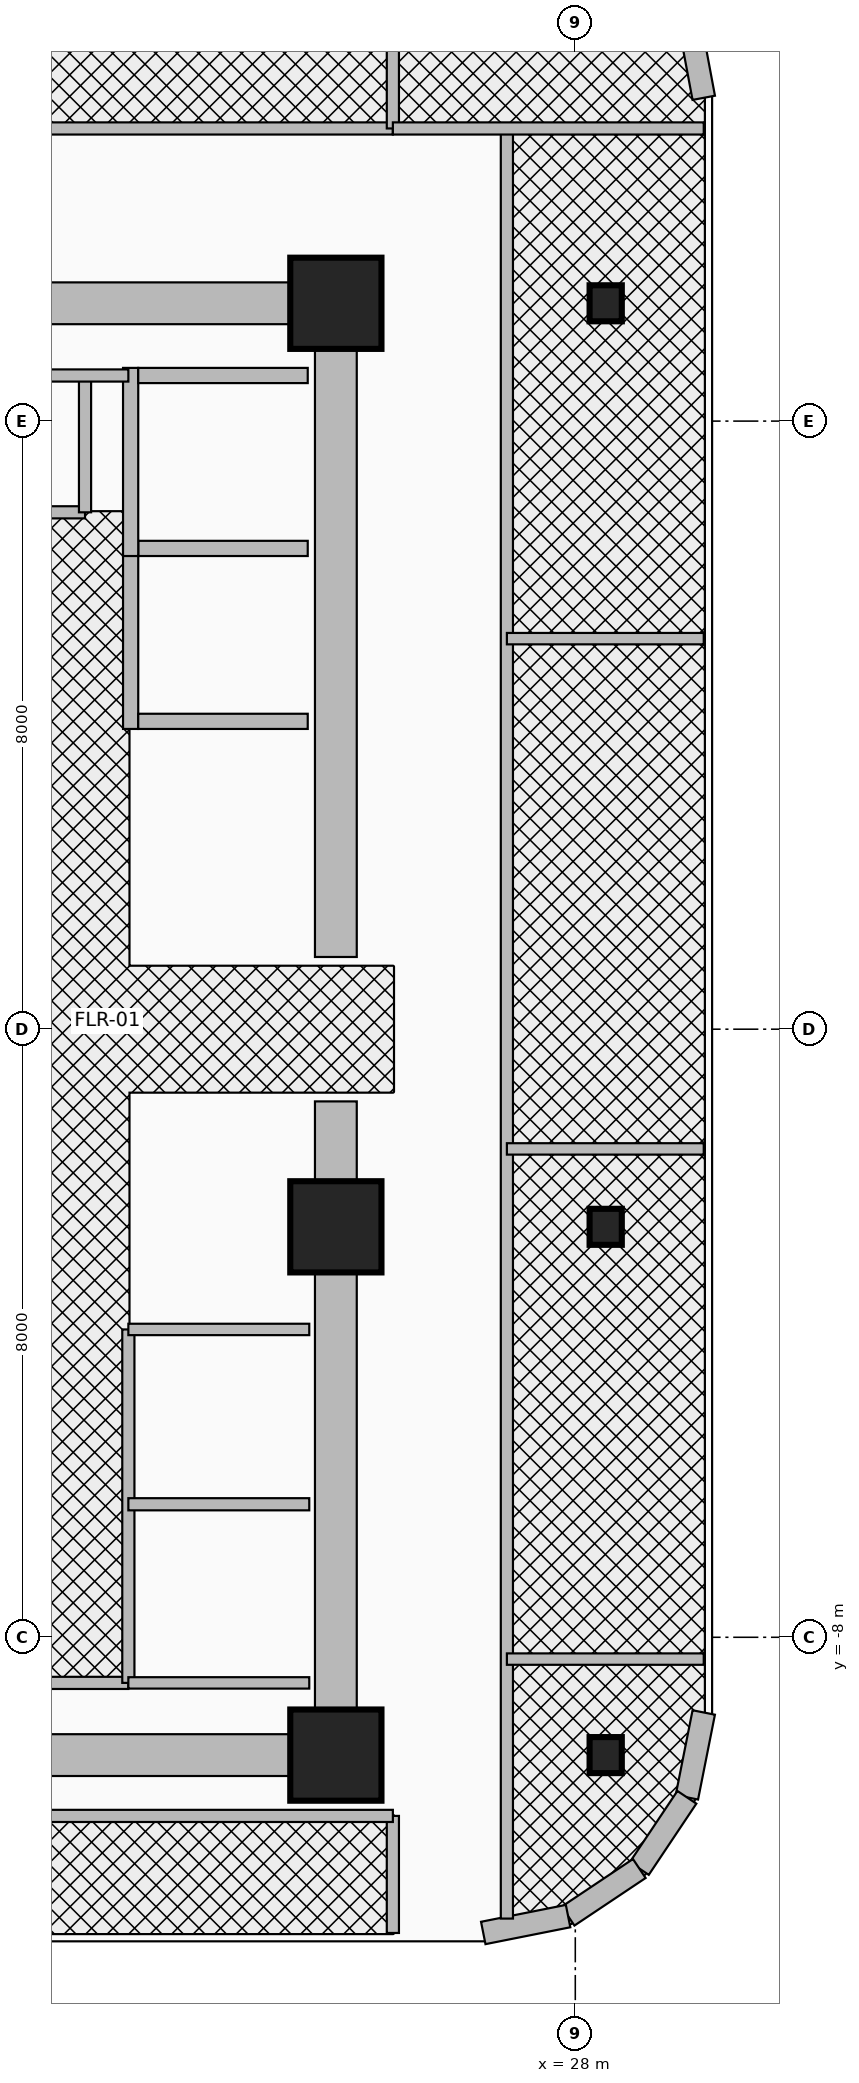
"""IFC4 building model, lengths in metres.
Left out: names, types, materials, properties, quantities, classifications, styles, units other than length and angle.
Written with IfcOpenShell. Run it as: python <this file> out.ifc"""

import sys

from ifc_helpers import new_model, si_unit, direction, frame, frame_2d, origin, origin_2d, place, context, subcontext, project, spatial, rectangle, i_section, extrude, source, transform, mapped, element, fill, save


model = new_model("IFC4")
c1 = context("Model", 3, precision=1e-05, world=origin(), true_north=direction((0.0, 1.0)))
c2 = subcontext(c1, "Body", "Model", "MODEL_VIEW")
j1 = project(units=[si_unit("LENGTHUNIT", "METRE"), si_unit("PLANEANGLEUNIT", "RADIAN")], contexts=[c1])
p1 = place(None, origin())
s1 = spatial("IfcSite", under=j1, at=p1, CompositionType="ELEMENT")
p2 = place(p1, origin())
s2 = spatial("IfcBuilding", under=s1, at=p2, CompositionType="ELEMENT")
p3 = place(p2, frame((0.0, 0.0, 153.8)))
s3 = spatial("IfcBuildingStorey", under=s2, at=p3, CompositionType="ELEMENT", Elevation=153.8)
for number, where, z_axis, x_axis in (
    (1, (24.85, -9.825, 0.0), (0.0, 0.0, 1.0), (0.0, 1.0, 0.0)),
    (2, (24.85, 0.95, 0.0), (0.0, 0.0, 1.0), (0.0, 1.0, 0.0)),
):
    element("IfcWall", number, at=place(p3, frame(where, z_axis=z_axis, x_axis=x_axis)), inside=s3, PredefinedType="SHEAR", context=c2, shape_type="SweptSolid", body=[
        extrude(rectangle(XDim=8.875, YDim=0.55, at=frame_2d((4.438, 0.0))), origin(), (0.0, 0.0, 1.0), 3.46),
    ])
for number, where, z_axis, x_axis in (
    (3, (15.85, 9.55, 0.0), (0.0, 0.0, 1.0), (1.0, 0.0, 0.0)),
    (4, (15.85, -9.55, 0.0), (0.0, 0.0, 1.0), (1.0, 0.0, 0.0)),
):
    element("IfcWall", number, at=place(p3, frame(where, z_axis=z_axis, x_axis=x_axis)), inside=s3, PredefinedType="SHEAR", context=c2, shape_type="SweptSolid", body=[
        extrude(rectangle(XDim=9.0, YDim=0.55, at=frame_2d((4.5, 0.0))), origin(), (0.0, 0.0, 1.0), 3.46),
    ])
m1 = source(origin(), c2, "Body", "SweptSolid", [
    extrude(rectangle(XDim=1.2, YDim=1.2, at=origin_2d()), origin(), (0.0, 0.0, 1.0), 3.7),
])
p4 = place(p3, frame((24.85, -9.55, 0.0), z_axis=(0.0, 0.0, 1.0), x_axis=(1.0, 0.0, 0.0)))
e5 = element("IfcColumn", 5, at=p4, inside=s3, PredefinedType="COLUMN", context=c2, shape_type="MappedRepresentation", body=[
    mapped(m1, transform((0.0, 0.0, 0.0), x_axis=(1.0, 0.0, 0.0), y_axis=(0.0, 1.0, 0.0), z_axis=(0.0, 0.0, 1.0), scale=1.0)),
])
m2 = source(origin(), c2, "Body", "SweptSolid", [
    extrude(i_section(OverallWidth=0.424, OverallDepth=0.474, WebThickness=0.048, FlangeThickness=0.077, at=origin_2d()), origin(), (0.0, 0.0, 1.0), 3.7),
])
p5 = place(p3, frame((28.4, -9.55, 0.0), z_axis=(0.0, 0.0, 1.0), x_axis=(1.0, 0.0, 0.0)))
e6 = element("IfcColumn", 6, at=p5, inside=s3, PredefinedType="COLUMN", context=c2, shape_type="MappedRepresentation", body=[
    mapped(m2, transform((0.0, 0.0, 0.0), x_axis=(1.0, 0.0, 0.0), y_axis=(0.0, 1.0, 0.0), z_axis=(0.0, 0.0, 1.0), scale=1.0)),
])
p6 = place(p3, frame((24.85, -2.6, 0.0), z_axis=(0.0, 0.0, 1.0), x_axis=(1.0, 0.0, 0.0)))
e7 = element("IfcColumn", 7, at=p6, inside=s3, PredefinedType="COLUMN", context=c2, shape_type="MappedRepresentation", body=[
    mapped(m1, transform((0.0, 0.0, 0.0), x_axis=(1.0, 0.0, 0.0), y_axis=(0.0, 1.0, 0.0), z_axis=(0.0, 0.0, 1.0), scale=1.0)),
])
p7 = place(p3, frame((28.4, -2.6, 0.0), z_axis=(0.0, 0.0, 1.0), x_axis=(1.0, 0.0, 0.0)))
e8 = element("IfcColumn", 8, at=p7, inside=s3, PredefinedType="COLUMN", context=c2, shape_type="MappedRepresentation", body=[
    mapped(m2, transform((0.0, 0.0, 0.0), x_axis=(1.0, 0.0, 0.0), y_axis=(0.0, 1.0, 0.0), z_axis=(0.0, 0.0, 1.0), scale=1.0)),
])
p8 = place(p3, frame((24.85, 9.55, 0.0), z_axis=(0.0, 0.0, 1.0), x_axis=(1.0, 0.0, 0.0)))
e9 = element("IfcColumn", 9, at=p8, inside=s3, PredefinedType="COLUMN", context=c2, shape_type="MappedRepresentation", body=[
    mapped(m1, transform((0.0, 0.0, 0.0), x_axis=(1.0, 0.0, 0.0), y_axis=(0.0, 1.0, 0.0), z_axis=(0.0, 0.0, 1.0), scale=1.0)),
])
p9 = place(p3, frame((28.4, 9.55, 0.0), z_axis=(0.0, 0.0, 1.0), x_axis=(1.0, 0.0, 0.0)))
e10 = element("IfcColumn", 10, at=p9, inside=s3, PredefinedType="COLUMN", context=c2, shape_type="MappedRepresentation", body=[
    mapped(m2, transform((0.0, 0.0, 0.0), x_axis=(1.0, 0.0, 0.0), y_axis=(0.0, 1.0, 0.0), z_axis=(0.0, 0.0, 1.0), scale=1.0)),
])
p10 = place(p3, frame((29.493, 13.307, 0.0), z_axis=(0.0, 0.0, 1.0), x_axis=(0.183752343116, -0.98297257154, 0.0)))
e11 = element("IfcWall", 11, at=p10, inside=s3, PredefinedType="SOLIDWALL", context=c2, shape_type="SweptSolid", body=[
    extrude(rectangle(XDim=1.072, YDim=0.3, at=frame_2d((0.536, 0.0))), origin(), (0.0, 0.0, 1.0), 3.46),
])
p11 = place(p3, frame((29.69, -8.989, 0.0), z_axis=(0.0, 0.0, 1.0), x_axis=(-0.195043173023, -0.980794657743, 0.0)))
e12 = element("IfcWall", 12, at=p11, inside=s3, PredefinedType="SOLIDWALL", context=c2, shape_type="SweptSolid", body=[
    extrude(rectangle(XDim=1.138, YDim=0.3, at=frame_2d((0.569, 0.0))), origin(), (0.0, 0.0, 1.0), 3.46),
])
for number, where, z_axis, x_axis in (
    (13, (29.468, -10.105, 0.0), (0.0, 0.0, 1.0), (-0.556, -0.831, 0.0)),
    (14, (28.842, -11.042, 0.0), (0.0, 0.0, 1.0), (-0.831, -0.556, 0.0)),
):
    element("IfcWall", number, at=place(p3, frame(where, z_axis=z_axis, x_axis=x_axis)), inside=s3, PredefinedType="SOLIDWALL", context=c2, shape_type="SweptSolid", body=[
        extrude(rectangle(XDim=1.127, YDim=0.3, at=frame_2d((0.563, 0.0))), origin(), (0.0, 0.0, 1.0), 3.46),
    ])
p12 = place(p3, frame((27.905, -11.668, 0.0), z_axis=(0.0, 0.0, 1.0), x_axis=(-0.980794657743, -0.195043173023, 0.0)))
e15 = element("IfcWall", 15, at=p12, inside=s3, PredefinedType="SOLIDWALL", context=c2, shape_type="SweptSolid", body=[
    extrude(rectangle(XDim=1.138, YDim=0.3, at=frame_2d((0.569, 0.0))), origin(), (0.0, 0.0, 1.0), 3.46),
])
p13 = place(p3, frame((22.15, 3.95, 0.0), z_axis=(0.0, 0.0, 1.0), x_axis=(0.0, 1.0, 0.0)))
e16 = element("IfcWall", 16, at=p13, inside=s3, PredefinedType="MOVABLE", context=c2, shape_type="SweptSolid", body=[
    extrude(rectangle(XDim=2.475, YDim=0.2, at=frame_2d((1.238, 0.0))), origin(), (0.0, 0.0, 1.0), 3.46),
])
p14 = place(p13, frame((0.688, 0.0, 0.0)))
e17 = element("IfcOpeningElement", 17, at=p14, cuts=e16, PredefinedType="OPENING", context=c2, shape_type="SweptSolid", body=[
    extrude(rectangle(XDim=1.1, YDim=2.1, at=frame_2d((0.55, 1.05))), frame((0.0, 0.115, 0.0), z_axis=(0.0, -1.0, 0.0), x_axis=(1.0, 0.0, 0.0)), (0.0, 0.0, 1.0), 0.23),
])
for number, where, z_axis, x_axis in (
    (18, (22.25, 4.05, 0.0), (0.0, 0.0, 1.0), (1.0, 0.0, 0.0)),
    (19, (22.25, 6.325, 0.0), (0.0, 0.0, 1.0), (1.0, 0.0, 0.0)),
):
    element("IfcWall", number, at=place(p3, frame(where, z_axis=z_axis, x_axis=x_axis)), inside=s3, PredefinedType="MOVABLE", context=c2, shape_type="SweptSolid", body=[
        extrude(rectangle(XDim=2.23, YDim=0.2, at=frame_2d((1.115, 0.0))), origin(), (0.0, 0.0, 1.0), 3.46),
    ])
p15 = place(p3, frame((22.15, 6.225, 0.0), z_axis=(0.0, 0.0, 1.0), x_axis=(0.0, 1.0, 0.0)))
e20 = element("IfcWall", 20, at=p15, inside=s3, PredefinedType="MOVABLE", context=c2, shape_type="SweptSolid", body=[
    extrude(rectangle(XDim=2.475, YDim=0.2, at=frame_2d((1.237, 0.0))), origin(), (0.0, 0.0, 1.0), 3.46),
])
p16 = place(p15, frame((0.688, 0.0, 0.0)))
e21 = element("IfcOpeningElement", 21, at=p16, cuts=e20, PredefinedType="OPENING", context=c2, shape_type="SweptSolid", body=[
    extrude(rectangle(XDim=1.1, YDim=2.1, at=frame_2d((0.55, 1.05))), frame((0.0, 0.115, 0.0), z_axis=(0.0, -1.0, 0.0), x_axis=(1.0, 0.0, 0.0)), (0.0, 0.0, 1.0), 0.23),
])
p17 = place(p3, frame((22.25, 8.6, 0.0), z_axis=(0.0, 0.0, 1.0), x_axis=(1.0, 0.0, 0.0)))
e22 = element("IfcWall", 22, at=p17, inside=s3, PredefinedType="MOVABLE", context=c2, shape_type="SweptSolid", body=[
    extrude(rectangle(XDim=2.23, YDim=0.2, at=frame_2d((1.115, 0.0))), origin(), (0.0, 0.0, 1.0), 3.46),
])
p18 = place(p3, frame((20.35, 6.8, 0.0), z_axis=(0.0, 0.0, 1.0), x_axis=(1.0, 0.0, 0.0)))
e23 = element("IfcWall", 23, at=p18, inside=s3, PredefinedType="PARTITIONING", context=c2, shape_type="SweptSolid", body=[
    extrude(rectangle(XDim=1.2, YDim=0.16, at=frame_2d((0.6, 0.0))), origin(), (0.0, 0.0, 1.0), 3.46),
])
p19 = place(p18, frame((0.175, 0.0, 0.0)))
e24 = element("IfcOpeningElement", 24, at=p19, cuts=e23, PredefinedType="OPENING", context=c2, shape_type="SweptSolid", body=[
    extrude(rectangle(XDim=0.85, YDim=2.05, at=frame_2d((0.425, 1.025))), frame((0.0, 0.095, 0.0), z_axis=(0.0, -1.0, 0.0), x_axis=(1.0, 0.0, 0.0)), (0.0, 0.0, 1.0), 0.19),
])
p20 = place(p3, frame((21.55, 6.8, 0.0), z_axis=(0.0, 0.0, 1.0), x_axis=(0.0, 1.0, 0.0)))
e25 = element("IfcWall", 25, at=p20, inside=s3, PredefinedType="PARTITIONING", context=c2, shape_type="SweptSolid", body=[
    extrude(rectangle(XDim=1.8, YDim=0.16, at=frame_2d((0.9, 0.0))), origin(), (0.0, 0.0, 1.0), 3.46),
])
for number, where, z_axis, x_axis in (
    (26, (20.3, -8.6, 0.0), (0.0, 0.0, 1.0), (1.0, 0.0, 0.0)),
    (27, (20.3, 8.6, 0.0), (0.0, 0.0, 1.0), (1.0, 0.0, 0.0)),
):
    element("IfcWall", number, at=place(p3, frame(where, z_axis=z_axis, x_axis=x_axis)), inside=s3, PredefinedType="PARTITIONING", context=c2, shape_type="SweptSolid", body=[
        extrude(rectangle(XDim=1.82, YDim=0.16, at=frame_2d((0.91, 0.0))), origin(), (0.0, 0.0, 1.0), 3.46),
    ])
p21 = place(p3, frame((22.12, -8.6, 0.0), z_axis=(0.0, 0.0, 1.0), x_axis=(0.0, 1.0, 0.0)))
e28 = element("IfcWall", 28, at=p21, inside=s3, PredefinedType="PARTITIONING", context=c2, shape_type="SweptSolid", body=[
    extrude(rectangle(XDim=4.65, YDim=0.16, at=frame_2d((2.325, 0.0))), origin(), (0.0, 0.0, 1.0), 3.46),
])
p22 = place(p21, frame((0.7, 0.0, 0.0)))
e29 = element("IfcOpeningElement", 29, at=p22, cuts=e28, PredefinedType="OPENING", context=c2, shape_type="SweptSolid", body=[
    extrude(rectangle(XDim=0.85, YDim=2.05, at=frame_2d((0.425, 1.025))), frame((0.0, 0.095, 0.0), z_axis=(0.0, -1.0, 0.0), x_axis=(1.0, 0.0, 0.0)), (0.0, 0.0, 1.0), 0.19),
])
p23 = place(p21, frame((3.0, 0.0, 0.0)))
e30 = element("IfcOpeningElement", 30, at=p23, cuts=e28, PredefinedType="OPENING", context=c2, shape_type="SweptSolid", body=[
    extrude(rectangle(XDim=0.85, YDim=2.05, at=frame_2d((0.425, 1.025))), frame((0.0, 0.095, 0.0), z_axis=(0.0, -1.0, 0.0), x_axis=(1.0, 0.0, 0.0)), (0.0, 0.0, 1.0), 0.19),
])
for number, where, z_axis, x_axis in (
    (31, (22.12, -3.95, 0.0), (0.0, 0.0, 1.0), (1.0, 0.0, 0.0)),
    (32, (22.12, -8.6, 0.0), (0.0, 0.0, 1.0), (1.0, 0.0, 0.0)),
):
    element("IfcWall", number, at=place(p3, frame(where, z_axis=z_axis, x_axis=x_axis)), inside=s3, PredefinedType="PARTITIONING", context=c2, shape_type="SweptSolid", body=[
        extrude(rectangle(XDim=2.38, YDim=0.15, at=frame_2d((1.19, 0.0))), origin(), (0.0, 0.0, 1.0), 3.46),
    ])
p24 = place(p3, frame((22.12, -6.25, 0.0), z_axis=(0.0, 0.0, 1.0), x_axis=(1.0, 0.0, 0.0)))
e33 = element("IfcWall", 33, at=p24, inside=s3, PredefinedType="PARTITIONING", context=c2, shape_type="SweptSolid", body=[
    extrude(rectangle(XDim=2.38, YDim=0.16, at=frame_2d((1.19, 0.0))), origin(), (0.0, 0.0, 1.0), 3.46),
])
p25 = place(p3, frame((15.4, 11.85, 0.0), z_axis=(0.0, 0.0, 1.0), x_axis=(1.0, 0.0, 0.0)))
e34 = element("IfcWall", 34, at=p25, inside=s3, PredefinedType="PARTITIONING", context=c2, shape_type="SweptSolid", body=[
    extrude(rectangle(XDim=10.2, YDim=0.16, at=frame_2d((5.1, 0.0))), origin(), (0.0, 0.0, 1.0), 2.834),
])
p26 = place(p25, frame((4.625, 0.0, 0.0)))
e35 = element("IfcOpeningElement", 35, at=p26, cuts=e34, PredefinedType="OPENING", context=c2, shape_type="SweptSolid", body=[
    extrude(rectangle(XDim=0.95, YDim=2.15, at=frame_2d((0.475, 1.075))), frame((0.0, 0.095, 0.0), z_axis=(0.0, -1.0, 0.0), x_axis=(1.0, 0.0, 0.0)), (0.0, 0.0, 1.0), 0.19),
])
p27 = place(p3, frame((25.6, 11.85, 0.0), z_axis=(0.0, 0.0, 1.0), x_axis=(0.0, 1.0, 0.0)))
e36 = element("IfcWall", 36, at=p27, inside=s3, PredefinedType="PARTITIONING", context=c2, shape_type="SweptSolid", body=[
    extrude(rectangle(XDim=3.426, YDim=0.16, at=frame_2d((1.713, 0.0))), origin(), (0.0, 0.0, 1.0), 2.666),
])
p28 = place(p3, frame((25.6, -11.89, 0.0), z_axis=(0.0, 0.0, 1.0), x_axis=(0.0, 1.0, 0.0)))
e37 = element("IfcWall", 37, at=p28, inside=s3, PredefinedType="PARTITIONING", context=c2, shape_type="SweptSolid", body=[
    extrude(rectangle(XDim=1.54, YDim=0.16, at=frame_2d((0.77, 0.0))), origin(), (0.0, 0.0, 1.0), 3.46),
])
p29 = place(p28, frame((0.32, 0.0, 0.0)))
e38 = element("IfcOpeningElement", 38, at=p29, cuts=e37, PredefinedType="OPENING", context=c2, shape_type="SweptSolid", body=[
    extrude(rectangle(XDim=0.9, YDim=2.1, at=frame_2d((0.45, 1.05))), frame((0.0, 0.095, 0.0), z_axis=(0.0, -1.0, 0.0), x_axis=(1.0, 0.0, 0.0)), (0.0, 0.0, 1.0), 0.19),
])
p30 = place(p3, frame((14.146, -10.35, 0.0), z_axis=(0.0, 0.0, 1.0), x_axis=(1.0, 0.0, 0.0)))
e39 = element("IfcWall", 39, at=p30, inside=s3, PredefinedType="PARTITIONING", context=c2, shape_type="SweptSolid", body=[
    extrude(rectangle(XDim=11.454, YDim=0.16, at=frame_2d((5.727, 0.0))), origin(), (0.0, 0.0, 1.0), 3.46),
])
p31 = place(p3, frame((27.1, -11.701, 0.0), z_axis=(0.0, 0.0, 1.0), x_axis=(0.0, 1.0, 0.0)))
e40 = element("IfcWall", 40, at=p31, inside=s3, PredefinedType="PARTITIONING", context=c2, shape_type="SweptSolid", body=[
    extrude(rectangle(XDim=23.551, YDim=0.16, at=frame_2d((11.775, 0.0))), origin(), (0.0, 0.0, 1.0), 2.666),
])
p32 = place(p31, frame((0.8, 0.0, 0.0)))
e41 = element("IfcOpeningElement", 41, at=p32, cuts=e40, PredefinedType="OPENING", context=c2, shape_type="SweptSolid", body=[
    extrude(rectangle(XDim=0.9, YDim=2.1, at=frame_2d((0.45, 1.05))), frame((0.0, 0.095, 0.0), z_axis=(0.0, -1.0, 0.0), x_axis=(1.0, 0.0, 0.0)), (0.0, 0.0, 1.0), 0.19),
])
p33 = place(p31, frame((6.32, 0.0, 0.0)))
e42 = element("IfcOpeningElement", 42, at=p33, cuts=e40, PredefinedType="OPENING", context=c2, shape_type="SweptSolid", body=[
    extrude(rectangle(XDim=0.9, YDim=2.1, at=frame_2d((0.45, 1.05))), frame((0.0, 0.095, 0.0), z_axis=(0.0, -1.0, 0.0), x_axis=(1.0, 0.0, 0.0)), (0.0, 0.0, 1.0), 0.19),
])
p34 = place(p31, frame((13.032, 0.0, 0.0)))
e43 = element("IfcOpeningElement", 43, at=p34, cuts=e40, PredefinedType="OPENING", context=c2, shape_type="SweptSolid", body=[
    extrude(rectangle(XDim=0.9, YDim=2.1, at=frame_2d((0.45, 1.05))), frame((0.0, 0.095, 0.0), z_axis=(0.0, -1.0, 0.0), x_axis=(1.0, 0.0, 0.0)), (0.0, 0.0, 1.0), 0.19),
])
p35 = place(p31, frame((19.745, 0.0, 0.0)))
e44 = element("IfcOpeningElement", 44, at=p35, cuts=e40, PredefinedType="OPENING", context=c2, shape_type="SweptSolid", body=[
    extrude(rectangle(XDim=0.9, YDim=2.1, at=frame_2d((0.45, 1.05))), frame((0.0, 0.095, 0.0), z_axis=(0.0, -1.0, 0.0), x_axis=(1.0, 0.0, 0.0)), (0.0, 0.0, 1.0), 0.19),
])
p36 = place(p3, frame((25.6, 11.85, 0.0), z_axis=(0.0, 0.0, 1.0), x_axis=(1.0, 0.0, 0.0)))
e45 = element("IfcWall", 45, at=p36, inside=s3, PredefinedType="PARTITIONING", context=c2, shape_type="SweptSolid", body=[
    extrude(rectangle(XDim=4.09, YDim=0.16, at=frame_2d((2.045, 0.0))), origin(), (0.0, 0.0, 1.0), 2.896),
])
p37 = place(p36, frame((0.3, 0.0, 0.0)))
e46 = element("IfcOpeningElement", 46, at=p37, cuts=e45, PredefinedType="OPENING", context=c2, shape_type="SweptSolid", body=[
    extrude(rectangle(XDim=0.9, YDim=2.1, at=frame_2d((0.45, 1.05))), frame((0.0, 0.095, 0.0), z_axis=(0.0, -1.0, 0.0), x_axis=(1.0, 0.0, 0.0)), (0.0, 0.0, 1.0), 0.19),
])
for number, where, z_axis, x_axis in (
    (47, (27.1, -8.287, 0.0), (0.0, 0.0, 1.0), (1.0, 0.0, 0.0)),
    (48, (27.1, -1.575, 0.0), (0.0, 0.0, 1.0), (1.0, 0.0, 0.0)),
    (49, (27.1, 5.138, 0.0), (0.0, 0.0, 1.0), (1.0, 0.0, 0.0)),
):
    element("IfcWall", number, at=place(p3, frame(where, z_axis=z_axis, x_axis=x_axis)), inside=s3, PredefinedType="PARTITIONING", context=c2, shape_type="SweptSolid", body=[
        extrude(rectangle(XDim=2.59, YDim=0.15, at=frame_2d((1.295, 0.0))), origin(), (0.0, 0.0, 1.0), 2.896),
    ])
p38 = place(p14, origin())
e50 = element("IfcDoor", 50, at=p38, inside=s3, OperationType="DOUBLE_DOOR_SLIDING", PredefinedType="DOOR", context=c2, shape_type="SweptSolid", body=[
    extrude(rectangle(XDim=1.1, YDim=2.1, at=frame_2d((0.55, 1.05))), frame((0.0, 0.025, 0.0), z_axis=(0.0, -1.0, 0.0), x_axis=(1.0, 0.0, 0.0)), (0.0, 0.0, 1.0), 0.05),
])
fill(e17, e50)
p39 = place(p16, origin())
e51 = element("IfcDoor", 51, at=p39, inside=s3, OperationType="DOUBLE_DOOR_SLIDING", PredefinedType="DOOR", context=c2, shape_type="SweptSolid", body=[
    extrude(rectangle(XDim=1.1, YDim=2.1, at=frame_2d((0.55, 1.05))), frame((0.0, 0.025, 0.0), z_axis=(0.0, -1.0, 0.0), x_axis=(1.0, 0.0, 0.0)), (0.0, 0.0, 1.0), 0.05),
])
fill(e21, e51)
p40 = place(p19, origin())
e52 = element("IfcDoor", 52, at=p40, inside=s3, OperationType="SINGLE_SWING_LEFT", PredefinedType="DOOR", context=c2, shape_type="SweptSolid", body=[
    extrude(rectangle(XDim=0.85, YDim=2.05, at=frame_2d((0.425, 1.025))), frame((0.0, 0.025, 0.0), z_axis=(0.0, -1.0, 0.0), x_axis=(1.0, 0.0, 0.0)), (0.0, 0.0, 1.0), 0.05),
])
fill(e24, e52)
p41 = place(p22, origin())
e53 = element("IfcDoor", 53, at=p41, inside=s3, OperationType="SINGLE_SWING_RIGHT", PredefinedType="DOOR", context=c2, shape_type="SweptSolid", body=[
    extrude(rectangle(XDim=0.85, YDim=2.05, at=frame_2d((0.425, 1.025))), frame((0.0, 0.025, 0.0), z_axis=(0.0, -1.0, 0.0), x_axis=(1.0, 0.0, 0.0)), (0.0, 0.0, 1.0), 0.05),
])
fill(e29, e53)
p42 = place(p23, origin())
e54 = element("IfcDoor", 54, at=p42, inside=s3, OperationType="SINGLE_SWING_LEFT", PredefinedType="DOOR", context=c2, shape_type="SweptSolid", body=[
    extrude(rectangle(XDim=0.85, YDim=2.05, at=frame_2d((0.425, 1.025))), frame((0.0, 0.025, 0.0), z_axis=(0.0, -1.0, 0.0), x_axis=(1.0, 0.0, 0.0)), (0.0, 0.0, 1.0), 0.05),
])
fill(e30, e54)
p43 = place(p29, origin())
e55 = element("IfcDoor", 55, at=p43, inside=s3, OperationType="SINGLE_SWING_RIGHT", PredefinedType="DOOR", context=c2, shape_type="SweptSolid", body=[
    extrude(rectangle(XDim=0.9, YDim=2.1, at=frame_2d((0.45, 1.05))), frame((0.0, 0.025, 0.0), z_axis=(0.0, -1.0, 0.0), x_axis=(1.0, 0.0, 0.0)), (0.0, 0.0, 1.0), 0.05),
])
fill(e38, e55)
p44 = place(p37, origin())
e56 = element("IfcDoor", 56, at=p44, inside=s3, OperationType="SINGLE_SWING_LEFT", PredefinedType="DOOR", context=c2, shape_type="SweptSolid", body=[
    extrude(rectangle(XDim=0.9, YDim=2.1, at=frame_2d((0.45, 1.05))), frame((0.0, 0.025, 0.0), z_axis=(0.0, -1.0, 0.0), x_axis=(1.0, 0.0, 0.0)), (0.0, 0.0, 1.0), 0.05),
])
fill(e46, e56)
p45 = place(p32, origin())
e57 = element("IfcDoor", 57, at=p45, inside=s3, OperationType="SINGLE_SWING_RIGHT", PredefinedType="DOOR", context=c2, shape_type="SweptSolid", body=[
    extrude(rectangle(XDim=0.9, YDim=2.1, at=frame_2d((0.45, 1.05))), frame((0.0, 0.025, 0.0), z_axis=(0.0, -1.0, 0.0), x_axis=(1.0, 0.0, 0.0)), (0.0, 0.0, 1.0), 0.05),
])
fill(e41, e57)
p46 = place(p33, frame((0.9, 0.0, 0.0), z_axis=(0.0, 0.0, 1.0), x_axis=(-1.0, 0.0, 0.0)))
e58 = element("IfcDoor", 58, at=p46, inside=s3, OperationType="SINGLE_SWING_LEFT", PredefinedType="DOOR", context=c2, shape_type="SweptSolid", body=[
    extrude(rectangle(XDim=0.9, YDim=2.1, at=frame_2d((0.45, 1.05))), frame((0.0, 0.025, 0.0), z_axis=(0.0, -1.0, 0.0), x_axis=(1.0, 0.0, 0.0)), (0.0, 0.0, 1.0), 0.05),
])
fill(e42, e58)
p47 = place(p34, origin())
e59 = element("IfcDoor", 59, at=p47, inside=s3, OperationType="SINGLE_SWING_RIGHT", PredefinedType="DOOR", context=c2, shape_type="SweptSolid", body=[
    extrude(rectangle(XDim=0.9, YDim=2.1, at=frame_2d((0.45, 1.05))), frame((0.0, 0.025, 0.0), z_axis=(0.0, -1.0, 0.0), x_axis=(1.0, 0.0, 0.0)), (0.0, 0.0, 1.0), 0.05),
])
fill(e43, e59)
p48 = place(p35, frame((0.9, 0.0, 0.0), z_axis=(0.0, 0.0, 1.0), x_axis=(-1.0, 0.0, 0.0)))
e60 = element("IfcDoor", 60, at=p48, inside=s3, OperationType="SINGLE_SWING_LEFT", PredefinedType="DOOR", context=c2, shape_type="SweptSolid", body=[
    extrude(rectangle(XDim=0.9, YDim=2.1, at=frame_2d((0.45, 1.05))), frame((0.0, 0.025, 0.0), z_axis=(0.0, -1.0, 0.0), x_axis=(1.0, 0.0, 0.0)), (0.0, 0.0, 1.0), 0.05),
])
fill(e44, e60)
save(model, sys.argv[1])
